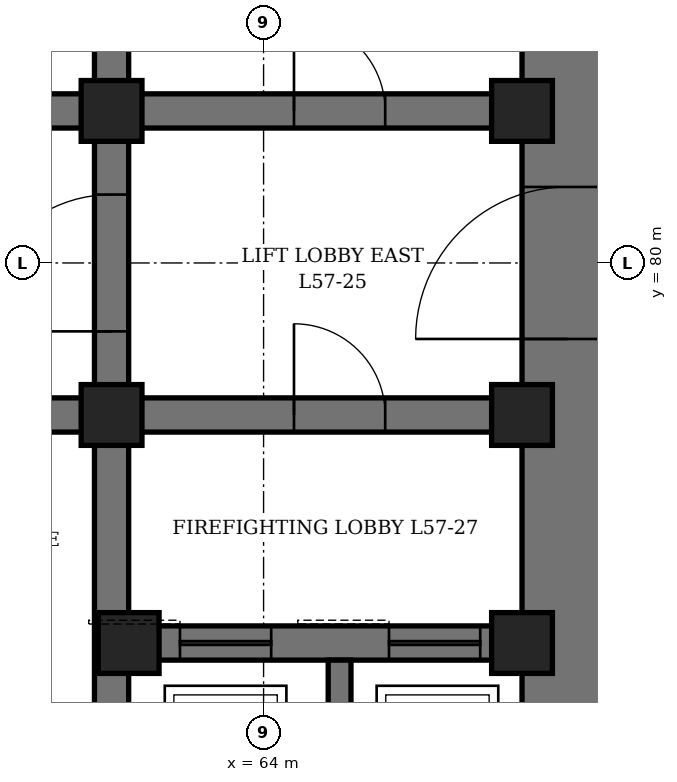
"""IFC4 building model, lengths in metres.
Left out: names, types, materials, properties, quantities, classifications, styles, units other than length and angle.
Written with IfcOpenShell. Run it as: python <this file> out.ifc"""

import sys

from ifc_helpers import new_model, si_unit, direction, frame, frame_2d, origin, origin_2d, place, context, subcontext, project, spatial, rectangle, hollow_rectangle, extrude, element, fill, save


model = new_model("IFC4")
c1 = context("Model", 3, precision=1e-05, world=origin(), true_north=direction((0.0, 1.0)))
c2 = subcontext(c1, "Body", "Model", "MODEL_VIEW")
j1 = project(units=[si_unit("LENGTHUNIT", "METRE"), si_unit("PLANEANGLEUNIT", "RADIAN")], contexts=[c1])
p1 = place(None, origin())
s1 = spatial("IfcSite", under=j1, at=p1, CompositionType="ELEMENT")
p2 = place(p1, origin())
s2 = spatial("IfcBuilding", under=s1, at=p2, CompositionType="ELEMENT")
p3 = place(p2, frame((0.0, 0.0, 254.5)))
s3 = spatial("IfcBuildingStorey", under=s2, at=p3, CompositionType="ELEMENT", Elevation=254.5)
p4 = place(p3, frame((68.0, 70.4, 0.0), z_axis=(0.0, 0.0, 1.0), x_axis=(0.0, 1.0, 0.0)))
e1 = element("IfcWall", 1, at=p4, inside=s3, PredefinedType="SHEAR", context=c2, shape_type="SweptSolid", body=[
    extrude(rectangle(XDim=19.2, YDim=1.2, at=frame_2d((9.6, 0.0))), origin(), (0.0, 0.0, 1.0), 4.2),
])
p5 = place(p4, frame((8.6, 0.0, 0.0)))
e2 = element("IfcOpeningElement", 2, at=p5, cuts=e1, PredefinedType="OPENING", context=c2, shape_type="SweptSolid", body=[
    extrude(rectangle(XDim=2.0, YDim=2.4, at=frame_2d((1.0, 1.2))), frame((0.0, 0.61, 0.0), z_axis=(0.0, -1.0, 0.0), x_axis=(1.0, 0.0, 0.0)), (0.0, 0.0, 1.0), 1.22),
])
p6 = place(p3, frame((62.0, 71.6, 0.0), z_axis=(0.0, 0.0, 1.0), x_axis=(0.0, 1.0, 0.0)))
e3 = element("IfcWall", 3, at=p6, inside=s3, PredefinedType="SHEAR", context=c2, shape_type="SweptSolid", body=[
    extrude(rectangle(XDim=16.8, YDim=0.45, at=frame_2d((8.4, 0.0))), origin(), (0.0, 0.0, 1.0), 4.2),
])
p7 = place(p6, frame((7.5, 0.0, 0.0)))
e4 = element("IfcOpeningElement", 4, at=p7, cuts=e3, PredefinedType="OPENING", context=c2, shape_type="SweptSolid", body=[
    extrude(rectangle(XDim=1.8, YDim=2.4, at=frame_2d((0.9, 1.2))), frame((0.0, 0.235, 0.0), z_axis=(0.0, -1.0, 0.0), x_axis=(1.0, 0.0, 0.0)), (0.0, 0.0, 1.0), 0.47),
])
p8 = place(p3, frame((62.225, 75.0, 0.0), z_axis=(0.0, 0.0, 1.0), x_axis=(1.0, 0.0, 0.0)))
e5 = element("IfcWall", 5, at=p8, inside=s3, PredefinedType="SHEAR", context=c2, shape_type="SweptSolid", body=[
    extrude(rectangle(XDim=5.175, YDim=0.45, at=frame_2d((2.587, 0.0))), origin(), (0.0, 0.0, 1.0), 4.2),
])
p9 = place(p8, frame((0.675, 0.0, 0.0)))
e6 = element("IfcOpeningElement", 6, at=p9, cuts=e5, PredefinedType="OPENING", context=c2, shape_type="SweptSolid", body=[
    extrude(rectangle(XDim=1.2, YDim=2.2, at=frame_2d((0.6, 1.1))), frame((0.0, 0.235, 0.0), z_axis=(0.0, -1.0, 0.0), x_axis=(1.0, 0.0, 0.0)), (0.0, 0.0, 1.0), 0.47),
])
p10 = place(p8, frame((3.425, 0.0, 0.0)))
e7 = element("IfcOpeningElement", 7, at=p10, cuts=e5, PredefinedType="OPENING", context=c2, shape_type="SweptSolid", body=[
    extrude(rectangle(XDim=1.2, YDim=2.2, at=frame_2d((0.6, 1.1))), frame((0.0, 0.235, 0.0), z_axis=(0.0, -1.0, 0.0), x_axis=(1.0, 0.0, 0.0)), (0.0, 0.0, 1.0), 0.47),
])
p11 = place(p3, frame((62.225, 78.0, 0.0), z_axis=(0.0, 0.0, 1.0), x_axis=(1.0, 0.0, 0.0)))
e8 = element("IfcWall", 8, at=p11, inside=s3, PredefinedType="SHEAR", context=c2, shape_type="SweptSolid", body=[
    extrude(rectangle(XDim=5.175, YDim=0.45, at=frame_2d((2.587, 0.0))), origin(), (0.0, 0.0, 1.0), 4.2),
])
p12 = place(p11, frame((2.175, 0.0, 0.0)))
e9 = element("IfcOpeningElement", 9, at=p12, cuts=e8, PredefinedType="OPENING", context=c2, shape_type="SweptSolid", body=[
    extrude(rectangle(XDim=1.2, YDim=2.1, at=frame_2d((0.6, 1.05))), frame((0.0, 0.235, 0.0), z_axis=(0.0, -1.0, 0.0), x_axis=(1.0, 0.0, 0.0)), (0.0, 0.0, 1.0), 0.47),
])
p13 = place(p3, frame((62.225, 82.0, 0.0), z_axis=(0.0, 0.0, 1.0), x_axis=(1.0, 0.0, 0.0)))
e10 = element("IfcWall", 10, at=p13, inside=s3, PredefinedType="SHEAR", context=c2, shape_type="SweptSolid", body=[
    extrude(rectangle(XDim=5.175, YDim=0.45, at=frame_2d((2.587, 0.0))), origin(), (0.0, 0.0, 1.0), 4.2),
])
p14 = place(p13, frame((2.175, 0.0, 0.0)))
e11 = element("IfcOpeningElement", 11, at=p14, cuts=e10, PredefinedType="OPENING", context=c2, shape_type="SweptSolid", body=[
    extrude(rectangle(XDim=1.2, YDim=2.1, at=frame_2d((0.6, 1.05))), frame((0.0, 0.235, 0.0), z_axis=(0.0, -1.0, 0.0), x_axis=(1.0, 0.0, 0.0)), (0.0, 0.0, 1.0), 0.47),
])
p15 = place(p3, frame((50.225, 78.0, 0.0), z_axis=(0.0, 0.0, 1.0), x_axis=(1.0, 0.0, 0.0)))
e12 = element("IfcWall", 12, at=p15, inside=s3, PredefinedType="SHEAR", context=c2, shape_type="SweptSolid", body=[
    extrude(rectangle(XDim=11.55, YDim=0.45, at=frame_2d((5.775, 0.0))), origin(), (0.0, 0.0, 1.0), 4.2),
])
p16 = place(p15, frame((0.825, 0.0, 0.0)))
e13 = element("IfcOpeningElement", 13, at=p16, cuts=e12, PredefinedType="OPENING", context=c2, shape_type="SweptSolid", body=[
    extrude(rectangle(XDim=0.9, YDim=2.1, at=frame_2d((0.45, 1.05))), frame((0.0, 0.235, 0.0), z_axis=(0.0, -1.0, 0.0), x_axis=(1.0, 0.0, 0.0)), (0.0, 0.0, 1.0), 0.47),
])
p17 = place(p15, frame((3.825, 0.0, 0.0)))
e14 = element("IfcOpeningElement", 14, at=p17, cuts=e12, PredefinedType="OPENING", context=c2, shape_type="SweptSolid", body=[
    extrude(rectangle(XDim=0.9, YDim=2.1, at=frame_2d((0.45, 1.05))), frame((0.0, 0.235, 0.0), z_axis=(0.0, -1.0, 0.0), x_axis=(1.0, 0.0, 0.0)), (0.0, 0.0, 1.0), 0.47),
])
p18 = place(p15, frame((6.825, 0.0, 0.0)))
e15 = element("IfcOpeningElement", 15, at=p18, cuts=e12, PredefinedType="OPENING", context=c2, shape_type="SweptSolid", body=[
    extrude(rectangle(XDim=0.9, YDim=2.1, at=frame_2d((0.45, 1.05))), frame((0.0, 0.235, 0.0), z_axis=(0.0, -1.0, 0.0), x_axis=(1.0, 0.0, 0.0)), (0.0, 0.0, 1.0), 0.47),
])
p19 = place(p15, frame((9.825, 0.0, 0.0)))
e16 = element("IfcOpeningElement", 16, at=p19, cuts=e12, PredefinedType="OPENING", context=c2, shape_type="SweptSolid", body=[
    extrude(rectangle(XDim=0.9, YDim=2.1, at=frame_2d((0.45, 1.05))), frame((0.0, 0.235, 0.0), z_axis=(0.0, -1.0, 0.0), x_axis=(1.0, 0.0, 0.0)), (0.0, 0.0, 1.0), 0.47),
])
p20 = place(p3, frame((50.225, 82.0, 0.0), z_axis=(0.0, 0.0, 1.0), x_axis=(1.0, 0.0, 0.0)))
e17 = element("IfcWall", 17, at=p20, inside=s3, PredefinedType="SHEAR", context=c2, shape_type="SweptSolid", body=[
    extrude(rectangle(XDim=11.55, YDim=0.45, at=frame_2d((5.775, 0.0))), origin(), (0.0, 0.0, 1.0), 4.2),
])
p21 = place(p20, frame((0.825, 0.0, 0.0)))
e18 = element("IfcOpeningElement", 18, at=p21, cuts=e17, PredefinedType="OPENING", context=c2, shape_type="SweptSolid", body=[
    extrude(rectangle(XDim=0.9, YDim=2.1, at=frame_2d((0.45, 1.05))), frame((0.0, 0.235, 0.0), z_axis=(0.0, -1.0, 0.0), x_axis=(1.0, 0.0, 0.0)), (0.0, 0.0, 1.0), 0.47),
])
p22 = place(p20, frame((3.825, 0.0, 0.0)))
e19 = element("IfcOpeningElement", 19, at=p22, cuts=e17, PredefinedType="OPENING", context=c2, shape_type="SweptSolid", body=[
    extrude(rectangle(XDim=0.9, YDim=2.1, at=frame_2d((0.45, 1.05))), frame((0.0, 0.235, 0.0), z_axis=(0.0, -1.0, 0.0), x_axis=(1.0, 0.0, 0.0)), (0.0, 0.0, 1.0), 0.47),
])
p23 = place(p20, frame((6.825, 0.0, 0.0)))
e20 = element("IfcOpeningElement", 20, at=p23, cuts=e17, PredefinedType="OPENING", context=c2, shape_type="SweptSolid", body=[
    extrude(rectangle(XDim=0.9, YDim=2.1, at=frame_2d((0.45, 1.05))), frame((0.0, 0.235, 0.0), z_axis=(0.0, -1.0, 0.0), x_axis=(1.0, 0.0, 0.0)), (0.0, 0.0, 1.0), 0.47),
])
p24 = place(p20, frame((9.825, 0.0, 0.0)))
e21 = element("IfcOpeningElement", 21, at=p24, cuts=e17, PredefinedType="OPENING", context=c2, shape_type="SweptSolid", body=[
    extrude(rectangle(XDim=0.9, YDim=2.1, at=frame_2d((0.45, 1.05))), frame((0.0, 0.235, 0.0), z_axis=(0.0, -1.0, 0.0), x_axis=(1.0, 0.0, 0.0)), (0.0, 0.0, 1.0), 0.47),
])
p25 = place(p3, frame((65.0, 71.6, 0.0), z_axis=(0.0, 0.0, 1.0), x_axis=(0.0, 1.0, 0.0)))
e22 = element("IfcWall", 22, at=p25, inside=s3, PredefinedType="SHEAR", context=c2, shape_type="SweptSolid", body=[
    extrude(rectangle(XDim=3.175, YDim=0.3, at=frame_2d((1.587, 0.0))), origin(), (0.0, 0.0, 1.0), 4.2),
])
for number, where, z_axis, x_axis in (
    (23, (62.0, 78.0, 0.0), (0.0, 0.0, 1.0), (1.0, 0.0, 0.0)),
    (24, (62.0, 82.0, 0.0), (0.0, 0.0, 1.0), (1.0, 0.0, 0.0)),
    (25, (62.225, 75.0, 0.0), (0.0, 0.0, 1.0), (1.0, 0.0, 0.0)),
    (26, (67.4, 75.0, 0.0), (0.0, 0.0, 1.0), (1.0, 0.0, 0.0)),
    (27, (67.4, 78.0, 0.0), (0.0, 0.0, 1.0), (1.0, 0.0, 0.0)),
    (28, (67.4, 82.0, 0.0), (0.0, 0.0, 1.0), (1.0, 0.0, 0.0)),
):
    element("IfcColumn", number, at=place(p3, frame(where, z_axis=z_axis, x_axis=x_axis)), inside=s3, PredefinedType="COLUMN", context=c2, shape_type="SweptSolid", body=[
        extrude(hollow_rectangle(XDim=0.8, YDim=0.8, WallThickness=0.1, at=origin_2d()), origin(), (0.0, 0.0, 1.0), 4.2),
    ])
p26 = place(p14, origin())
e29 = element("IfcDoor", 29, at=p26, inside=s3, OperationType="SINGLE_SWING_LEFT", PredefinedType="DOOR", context=c2, shape_type="SweptSolid", body=[
    extrude(rectangle(XDim=1.2, YDim=2.1, at=frame_2d((0.6, 1.05))), frame((0.0, 0.225, 0.0), z_axis=(0.0, -1.0, 0.0), x_axis=(1.0, 0.0, 0.0)), (0.0, 0.0, 1.0), 0.449),
])
fill(e11, e29)
p27 = place(p5, origin())
e30 = element("IfcDoor", 30, at=p27, inside=s3, OperationType="DOUBLE_DOOR_SINGLE_SWING", PredefinedType="DOOR", context=c2, shape_type="SweptSolid", body=[
    extrude(rectangle(XDim=2.0, YDim=2.4, at=frame_2d((1.0, 1.2))), frame((0.0, 0.35, 0.0), z_axis=(0.0, -1.0, 0.0), x_axis=(1.0, 0.0, 0.0)), (0.0, 0.0, 1.0), 0.7),
])
fill(e2, e30)
p28 = place(p7, origin())
e31 = element("IfcDoor", 31, at=p28, inside=s3, OperationType="DOUBLE_DOOR_SINGLE_SWING", PredefinedType="DOOR", context=c2, shape_type="SweptSolid", body=[
    extrude(rectangle(XDim=1.8, YDim=2.4, at=frame_2d((0.9, 1.2))), frame((0.0, 0.225, 0.0), z_axis=(0.0, -1.0, 0.0), x_axis=(1.0, 0.0, 0.0)), (0.0, 0.0, 1.0), 0.449),
])
fill(e4, e31)
p29 = place(p12, origin())
e32 = element("IfcDoor", 32, at=p29, inside=s3, OperationType="SINGLE_SWING_RIGHT", PredefinedType="DOOR", context=c2, shape_type="SweptSolid", body=[
    extrude(rectangle(XDim=1.2, YDim=2.1, at=frame_2d((0.6, 1.05))), frame((0.0, 0.225, 0.0), z_axis=(0.0, -1.0, 0.0), x_axis=(1.0, 0.0, 0.0)), (0.0, 0.0, 1.0), 0.449),
])
fill(e9, e32)
p30 = place(p9, origin())
e33 = element("IfcDoor", 33, at=p30, inside=s3, OperationType="SLIDING_TO_LEFT", PredefinedType="DOOR", context=c2, shape_type="SweptSolid", body=[
    extrude(rectangle(XDim=1.2, YDim=2.2, at=frame_2d((0.6, 1.1))), frame((0.0, 0.225, 0.0), z_axis=(0.0, -1.0, 0.0), x_axis=(1.0, 0.0, 0.0)), (0.0, 0.0, 1.0), 0.449),
])
fill(e6, e33)
p31 = place(p10, origin())
e34 = element("IfcDoor", 34, at=p31, inside=s3, OperationType="SLIDING_TO_LEFT", PredefinedType="DOOR", context=c2, shape_type="SweptSolid", body=[
    extrude(rectangle(XDim=1.2, YDim=2.2, at=frame_2d((0.6, 1.1))), frame((0.0, 0.225, 0.0), z_axis=(0.0, -1.0, 0.0), x_axis=(1.0, 0.0, 0.0)), (0.0, 0.0, 1.0), 0.449),
])
fill(e7, e34)
save(model, sys.argv[1])
